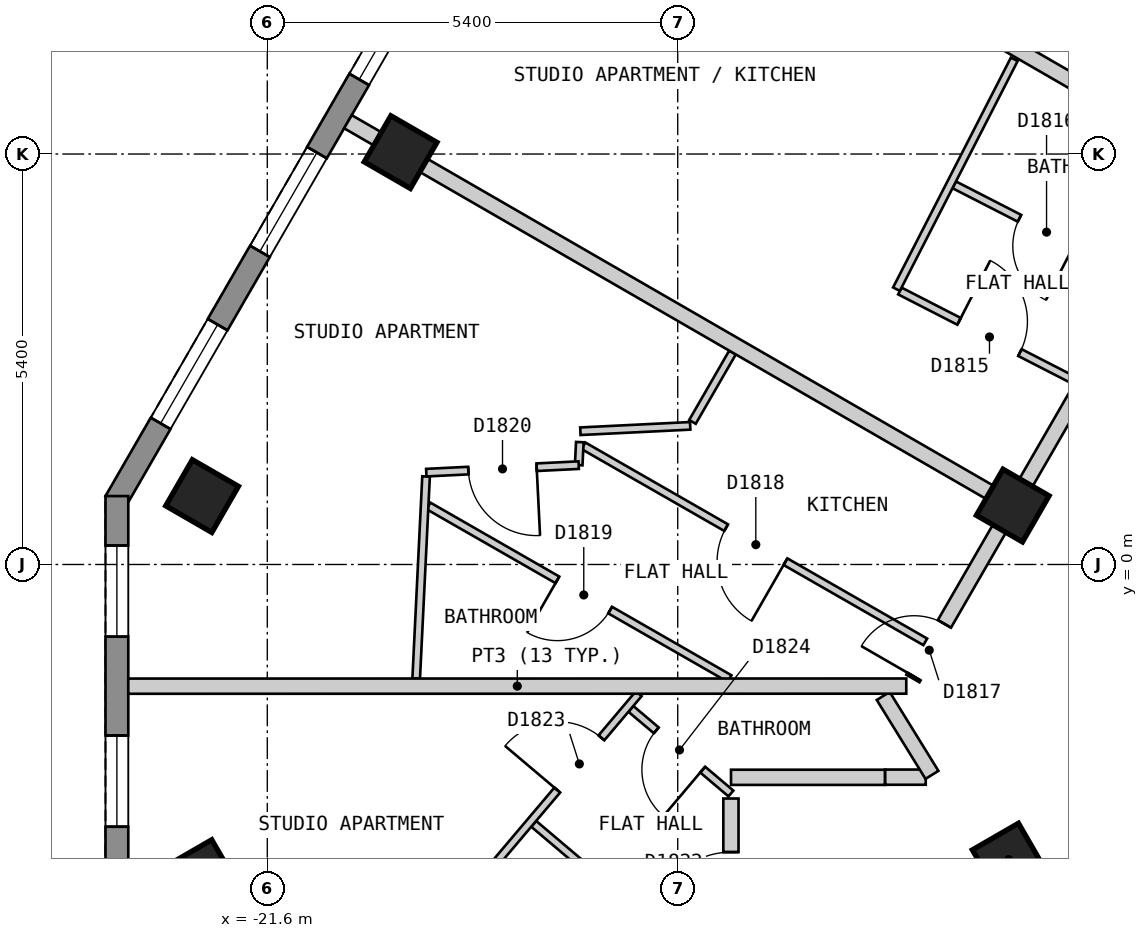
"""IFC4 building model, lengths in metres.
Left out: names, types, materials, properties, quantities, classifications, styles, units other than length and angle.
Written with IfcOpenShell. Run it as: python <this file> out.ifc"""

import sys

from ifc_helpers import new_model, si_unit, direction, frame, frame_2d, origin, origin_2d, place, context, subcontext, project, spatial, polyline, rectangle, outline, extrude, element, fill, save


model = new_model("IFC4")
c1 = context("Model", 3, precision=1e-05, world=origin(), true_north=direction((0.0, 1.0)))
c2 = subcontext(c1, "Body", "Model", "MODEL_VIEW")
j1 = project(units=[si_unit("LENGTHUNIT", "METRE"), si_unit("PLANEANGLEUNIT", "RADIAN")], contexts=[c1])
p1 = place(None, origin())
s1 = spatial("IfcSite", under=j1, at=p1, CompositionType="ELEMENT")
p2 = place(p1, origin())
s2 = spatial("IfcBuilding", under=s1, at=p2, CompositionType="ELEMENT")
p3 = place(p2, frame((0.0, 0.0, 208.8)))
s3 = spatial("IfcBuildingStorey", under=s2, at=p3, CompositionType="ELEMENT", Elevation=208.8)
for number, where, z_axis, x_axis in (
    (1, (-19.846, 5.425, 0.0), (0.0, 0.0, 1.0), (-0.5, -0.866, 0.0)),
    (2, (-22.458, 0.9, 0.0), (0.0, 0.0, 1.0), (-0.5, -0.866, 0.0)),
    (3, (-22.459, -4.1, 0.0), (0.0, 0.0, 1.0), (0.5, -0.866, 0.0)),
    (4, (-11.845, -3.883, 0.0), (0.0, 0.0, 1.0), (0.5, -0.866, 0.0)),
    (5, (-11.792, 0.775, 0.0), (0.0, 0.0, 1.0), (-0.5, -0.866, 0.0)),
):
    element("IfcColumn", number, at=place(p3, frame(where, z_axis=z_axis, x_axis=x_axis)), inside=s3, PredefinedType="COLUMN", context=c2, shape_type="SweptSolid", body=[
        extrude(rectangle(XDim=0.7, YDim=0.7, at=origin_2d()), origin(), (0.0, 0.0, 1.0), 3.0),
    ])
p4 = place(p3, frame((-12.514, 20.025, 0.0), z_axis=(0.0, 0.0, 1.0), x_axis=(-0.500003656944, -0.866023292436, 0.0)))
e6 = element("IfcWall", 6, at=p4, inside=s3, PredefinedType="SOLIDWALL", context=c2, shape_type="SweptSolid", body=[
    extrude(outline(polyline([(0.0, -0.15), (22.17, -0.15), (22.09, 0.15), (0.08, 0.15), (0.0, -0.15)])), origin(), (0.0, 0.0, 1.0), 2.7),
])
p5 = place(p4, frame((1.191, 0.0, 0.15)))
e7 = element("IfcOpeningElement", 7, at=p5, cuts=e6, PredefinedType="OPENING", context=c2, shape_type="SweptSolid", body=[
    extrude(rectangle(XDim=1.5, YDim=2.1, at=frame_2d((0.75, 1.05))), frame((0.0, 0.16, 0.0), z_axis=(0.0, -1.0, 0.0), x_axis=(1.0, 0.0, 0.0)), (0.0, 0.0, 1.0), 0.32),
])
p6 = place(p4, frame((3.804, 0.0, 0.15)))
e8 = element("IfcOpeningElement", 8, at=p6, cuts=e6, PredefinedType="OPENING", context=c2, shape_type="SweptSolid", body=[
    extrude(rectangle(XDim=1.5, YDim=2.1, at=frame_2d((0.75, 1.05))), frame((0.0, 0.16, 0.0), z_axis=(0.0, -1.0, 0.0), x_axis=(1.0, 0.0, 0.0)), (0.0, 0.0, 1.0), 0.32),
])
p7 = place(p4, frame((6.416, 0.0, 0.15)))
e9 = element("IfcOpeningElement", 9, at=p7, cuts=e6, PredefinedType="OPENING", context=c2, shape_type="SweptSolid", body=[
    extrude(rectangle(XDim=1.5, YDim=2.1, at=frame_2d((0.75, 1.05))), frame((0.0, 0.16, 0.0), z_axis=(0.0, -1.0, 0.0), x_axis=(1.0, 0.0, 0.0)), (0.0, 0.0, 1.0), 0.32),
])
p8 = place(p4, frame((9.029, 0.0, 0.15)))
e10 = element("IfcOpeningElement", 10, at=p8, cuts=e6, PredefinedType="OPENING", context=c2, shape_type="SweptSolid", body=[
    extrude(rectangle(XDim=1.5, YDim=2.1, at=frame_2d((0.75, 1.05))), frame((0.0, 0.16, 0.0), z_axis=(0.0, -1.0, 0.0), x_axis=(1.0, 0.0, 0.0)), (0.0, 0.0, 1.0), 0.32),
])
p9 = place(p4, frame((11.641, 0.0, 0.15)))
e11 = element("IfcOpeningElement", 11, at=p9, cuts=e6, PredefinedType="OPENING", context=c2, shape_type="SweptSolid", body=[
    extrude(rectangle(XDim=1.5, YDim=2.1, at=frame_2d((0.75, 1.05))), frame((0.0, 0.16, 0.0), z_axis=(0.0, -1.0, 0.0), x_axis=(1.0, 0.0, 0.0)), (0.0, 0.0, 1.0), 0.32),
])
p10 = place(p4, frame((14.254, 0.0, 0.15)))
e12 = element("IfcOpeningElement", 12, at=p10, cuts=e6, PredefinedType="OPENING", context=c2, shape_type="SweptSolid", body=[
    extrude(rectangle(XDim=1.5, YDim=2.1, at=frame_2d((0.75, 1.05))), frame((0.0, 0.16, 0.0), z_axis=(0.0, -1.0, 0.0), x_axis=(1.0, 0.0, 0.0)), (0.0, 0.0, 1.0), 0.32),
])
p11 = place(p4, frame((16.866, 0.0, 0.15)))
e13 = element("IfcOpeningElement", 13, at=p11, cuts=e6, PredefinedType="OPENING", context=c2, shape_type="SweptSolid", body=[
    extrude(rectangle(XDim=1.5, YDim=2.1, at=frame_2d((0.75, 1.05))), frame((0.0, 0.16, 0.0), z_axis=(0.0, -1.0, 0.0), x_axis=(1.0, 0.0, 0.0)), (0.0, 0.0, 1.0), 0.32),
])
p12 = place(p4, frame((19.479, 0.0, 0.15)))
e14 = element("IfcOpeningElement", 14, at=p12, cuts=e6, PredefinedType="OPENING", context=c2, shape_type="SweptSolid", body=[
    extrude(rectangle(XDim=1.5, YDim=2.1, at=frame_2d((0.75, 1.05))), frame((0.0, 0.16, 0.0), z_axis=(0.0, -1.0, 0.0), x_axis=(1.0, 0.0, 0.0)), (0.0, 0.0, 1.0), 0.32),
])
p13 = place(p3, frame((-23.579, 0.9, 0.0), z_axis=(0.0, 0.0, 1.0), x_axis=(0.0, -1.0, 0.0)))
e15 = element("IfcWall", 15, at=p13, inside=s3, PredefinedType="SOLIDWALL", context=c2, shape_type="SweptSolid", body=[
    extrude(outline(polyline([(0.0, -0.15), (5.0, -0.15), (4.92, 0.15), (0.08, 0.15), (0.0, -0.15)])), origin(), (0.0, 0.0, 1.0), 2.7),
])
p14 = place(p13, frame((0.65, 0.0, 0.15)))
e16 = element("IfcOpeningElement", 16, at=p14, cuts=e15, PredefinedType="OPENING", context=c2, shape_type="SweptSolid", body=[
    extrude(rectangle(XDim=1.2, YDim=2.1, at=frame_2d((0.6, 1.05))), frame((0.0, 0.16, 0.0), z_axis=(0.0, -1.0, 0.0), x_axis=(1.0, 0.0, 0.0)), (0.0, 0.0, 1.0), 0.32),
])
p15 = place(p13, frame((3.15, 0.0, 0.15)))
e17 = element("IfcOpeningElement", 17, at=p15, cuts=e15, PredefinedType="OPENING", context=c2, shape_type="SweptSolid", body=[
    extrude(rectangle(XDim=1.2, YDim=2.1, at=frame_2d((0.6, 1.05))), frame((0.0, 0.16, 0.0), z_axis=(0.0, -1.0, 0.0), x_axis=(1.0, 0.0, 0.0)), (0.0, 0.0, 1.0), 0.32),
])
p16 = place(p3, frame((-13.472, -2.798, 0.0), z_axis=(0.0, 0.0, 1.0), x_axis=(1.0, 0.0, 0.0)))
e18 = element("IfcWall", 18, at=p16, inside=s3, PredefinedType="PARTITIONING", context=c2, shape_type="SweptSolid", body=[
    extrude(rectangle(XDim=0.535, YDim=0.2, at=frame_2d((0.268, 0.0))), origin(), (0.0, 0.0, 1.0), 2.7),
])
p17 = place(p3, frame((-15.499, -2.8, 0.0), z_axis=(0.0, 0.0, 1.0), x_axis=(1.0, 0.0, 0.0)))
e19 = element("IfcWall", 19, at=p17, inside=s3, PredefinedType="PARTITIONING", context=c2, shape_type="SweptSolid", body=[
    extrude(rectangle(XDim=2.025, YDim=0.2, at=frame_2d((1.012, 0.0))), origin(), (0.0, 0.0, 1.0), 2.7),
])
p18 = place(p3, frame((-13.106, -1.5, 0.0), z_axis=(0.0, 0.0, 1.0), x_axis=(0.500025705601, 0.86601056214, 0.0)))
e20 = element("IfcWall", 20, at=p18, inside=s3, PredefinedType="PARTITIONING", context=c2, shape_type="SweptSolid", body=[
    extrude(rectangle(XDim=7.735, YDim=0.2, at=frame_2d((3.868, 0.0))), origin(), (0.0, 0.0, 1.0), 2.7),
])
p19 = place(p18, frame((4.748, 0.0, 0.0)))
e21 = element("IfcOpeningElement", 21, at=p19, cuts=e20, PredefinedType="OPENING", context=c2, shape_type="SweptSolid", body=[
    extrude(rectangle(XDim=1.0, YDim=2.1, at=frame_2d((0.5, 1.05))), frame((0.0, 0.11, 0.0), z_axis=(0.0, -1.0, 0.0), x_axis=(1.0, 0.0, 0.0)), (0.0, 0.0, 1.0), 0.22),
])
p20 = place(p18, frame((0.03, 0.0, 0.0)))
e22 = element("IfcOpeningElement", 22, at=p20, cuts=e20, PredefinedType="OPENING", context=c2, shape_type="SweptSolid", body=[
    extrude(rectangle(XDim=0.8, YDim=2.1, at=frame_2d((0.4, 1.05))), frame((0.0, 0.11, 0.0), z_axis=(0.0, -1.0, 0.0), x_axis=(1.0, 0.0, 0.0)), (0.0, 0.0, 1.0), 0.22),
])
p21 = place(p3, frame((-15.5, -6.599, 0.0), z_axis=(0.0, 0.0, 1.0), x_axis=(0.0, 1.0, 0.0)))
e23 = element("IfcWall", 23, at=p21, inside=s3, PredefinedType="PARTITIONING", context=c2, shape_type="SweptSolid", body=[
    extrude(rectangle(XDim=3.52, YDim=0.2, at=frame_2d((1.76, 0.0))), origin(), (0.0, 0.0, 1.0), 2.7),
])
p22 = place(p21, frame((1.815, 0.0, 0.0)))
e24 = element("IfcOpeningElement", 24, at=p22, cuts=e23, PredefinedType="OPENING", context=c2, shape_type="SweptSolid", body=[
    extrude(rectangle(XDim=1.0, YDim=2.1, at=frame_2d((0.5, 1.05))), frame((0.0, 0.11, 0.0), z_axis=(0.0, -1.0, 0.0), x_axis=(1.0, 0.0, 0.0)), (0.0, 0.0, 1.0), 0.22),
])
p23 = place(p3, frame((-12.562, 4.995, 0.0), z_axis=(0.0, 0.0, 1.0), x_axis=(0.889807979554, -0.456335139478, 0.0)))
e25 = element("IfcWall", 25, at=p23, inside=s3, PredefinedType="PARTITIONING", context=c2, shape_type="SweptSolid", body=[
    extrude(rectangle(XDim=2.68, YDim=0.1, at=frame_2d((1.34, 0.0))), origin(), (0.0, 0.0, 1.0), 2.7),
])
p24 = place(p23, frame((0.965, 0.0, 0.0)))
e26 = element("IfcOpeningElement", 26, at=p24, cuts=e25, PredefinedType="OPENING", context=c2, shape_type="SweptSolid", body=[
    extrude(rectangle(XDim=0.8, YDim=2.1, at=frame_2d((0.4, 1.05))), frame((0.0, 0.06, 0.0), z_axis=(0.0, -1.0, 0.0), x_axis=(1.0, 0.0, 0.0)), (0.0, 0.0, 1.0), 0.12),
])
p25 = place(p3, frame((-13.277, 3.598, 0.0), z_axis=(0.0, 0.0, 1.0), x_axis=(0.889780322893, -0.456389063182, 0.0)))
e27 = element("IfcWall", 27, at=p25, inside=s3, PredefinedType="PARTITIONING", context=c2, shape_type="SweptSolid", body=[
    extrude(rectangle(XDim=2.601, YDim=0.1, at=frame_2d((1.3, 0.0))), origin(), (0.0, 0.0, 1.0), 2.7),
])
p26 = place(p25, frame((0.875, 0.0, 0.0)))
e28 = element("IfcOpeningElement", 28, at=p26, cuts=e27, PredefinedType="OPENING", context=c2, shape_type="SweptSolid", body=[
    extrude(rectangle(XDim=0.9, YDim=2.1, at=frame_2d((0.45, 1.05))), frame((0.0, 0.06, 0.0), z_axis=(0.0, -1.0, 0.0), x_axis=(1.0, 0.0, 0.0)), (0.0, 0.0, 1.0), 0.12),
])
p27 = place(p3, frame((-17.441, 1.562, 0.0), z_axis=(0.0, 0.0, 1.0), x_axis=(0.867419073464, -0.497578286293, 0.0)))
e29 = element("IfcWall", 29, at=p27, inside=s3, PredefinedType="PARTITIONING", context=c2, shape_type="SweptSolid", body=[
    extrude(rectangle(XDim=5.185, YDim=0.1, at=frame_2d((2.593, 0.0))), origin(), (0.0, 0.0, 1.0), 2.7),
])
p28 = place(p27, frame((2.165, 0.0, 0.0)))
e30 = element("IfcOpeningElement", 30, at=p28, cuts=e29, PredefinedType="OPENING", context=c2, shape_type="SweptSolid", body=[
    extrude(rectangle(XDim=0.9, YDim=2.1, at=frame_2d((0.45, 1.05))), frame((0.0, 0.06, 0.0), z_axis=(0.0, -1.0, 0.0), x_axis=(1.0, 0.0, 0.0)), (0.0, 0.0, 1.0), 0.12),
])
p29 = place(p3, frame((-19.48, 0.771, 0.0), z_axis=(0.0, 0.0, 1.0), x_axis=(0.86748552317, -0.497462427817, 0.0)))
e31 = element("IfcWall", 31, at=p29, inside=s3, PredefinedType="PARTITIONING", context=c2, shape_type="SweptSolid", body=[
    extrude(rectangle(XDim=4.567, YDim=0.1, at=frame_2d((2.284, 0.0))), origin(), (0.0, 0.0, 1.0), 2.7),
])
p30 = place(p29, frame((1.956, 0.0, 0.0)))
e32 = element("IfcOpeningElement", 32, at=p30, cuts=e31, PredefinedType="OPENING", context=c2, shape_type="SweptSolid", body=[
    extrude(rectangle(XDim=0.8, YDim=2.1, at=frame_2d((0.4, 1.05))), frame((0.0, 0.06, 0.0), z_axis=(0.0, -1.0, 0.0), x_axis=(1.0, 0.0, 0.0)), (0.0, 0.0, 1.0), 0.12),
])
p31 = place(p3, frame((-16.816, -1.9, 0.0), z_axis=(0.0, 0.0, 1.0), x_axis=(0.763509851459, -0.645796180482, 0.0)))
e33 = element("IfcWall", 33, at=p31, inside=s3, PredefinedType="PARTITIONING", context=c2, shape_type="SweptSolid", body=[
    extrude(rectangle(XDim=1.724, YDim=0.1, at=frame_2d((0.862, 0.0))), origin(), (0.0, 0.0, 1.0), 2.7),
])
p32 = place(p31, frame((0.437, 0.0, 0.0)))
e34 = element("IfcOpeningElement", 34, at=p32, cuts=e33, PredefinedType="OPENING", context=c2, shape_type="SweptSolid", body=[
    extrude(rectangle(XDim=0.8, YDim=2.1, at=frame_2d((0.4, 1.05))), frame((0.0, 0.06, 0.0), z_axis=(0.0, -1.0, 0.0), x_axis=(1.0, 0.0, 0.0)), (0.0, 0.0, 1.0), 0.12),
])
p33 = place(p3, frame((-18.095, -3.412, 0.0), z_axis=(0.0, 0.0, 1.0), x_axis=(0.763564811502, -0.645731196889, 0.0)))
e35 = element("IfcWall", 35, at=p33, inside=s3, PredefinedType="PARTITIONING", context=c2, shape_type="SweptSolid", body=[
    extrude(rectangle(XDim=3.267, YDim=0.1, at=frame_2d((1.634, 0.0))), origin(), (0.0, 0.0, 1.0), 2.7),
])
p34 = place(p33, frame((1.224, 0.0, 0.0)))
e36 = element("IfcOpeningElement", 36, at=p34, cuts=e35, PredefinedType="OPENING", context=c2, shape_type="SweptSolid", body=[
    extrude(rectangle(XDim=0.9, YDim=2.1, at=frame_2d((0.45, 1.05))), frame((0.0, 0.06, 0.0), z_axis=(0.0, -1.0, 0.0), x_axis=(1.0, 0.0, 0.0)), (0.0, 0.0, 1.0), 0.12),
])
p35 = place(p3, frame((-19.625, -5.144, 0.0), z_axis=(0.0, 0.0, 1.0), x_axis=(0.645668001073, 0.763618250431, 0.0)))
e37 = element("IfcWall", 37, at=p35, inside=s3, PredefinedType="PARTITIONING", context=c2, shape_type="SweptSolid", body=[
    extrude(rectangle(XDim=4.51, YDim=0.1, at=frame_2d((2.255, 0.0))), origin(), (0.0, 0.0, 1.0), 2.7),
])
p36 = place(p35, frame((2.85, 0.0, 0.0)))
e38 = element("IfcOpeningElement", 38, at=p36, cuts=e37, PredefinedType="OPENING", context=c2, shape_type="SweptSolid", body=[
    extrude(rectangle(XDim=0.9, YDim=2.1, at=frame_2d((0.45, 1.05))), frame((0.0, 0.06, 0.0), z_axis=(0.0, -1.0, 0.0), x_axis=(1.0, 0.0, 0.0)), (0.0, 0.0, 1.0), 0.12),
])
p37 = place(p3, frame((-16.006, 1.876, 0.0), z_axis=(0.0, 0.0, 1.0), x_axis=(0.499949632511, 0.866054481515, 0.0)))
e39 = element("IfcWall", 39, at=p37, inside=s3, PredefinedType="PARTITIONING", context=c2, shape_type="SweptSolid", body=[
    extrude(rectangle(XDim=1.054, YDim=0.1, at=frame_2d((0.527, 0.0))), origin(), (0.0, 0.0, 1.0), 2.7),
])
p38 = place(p3, frame((-13.322, 3.622, 0.0), z_axis=(0.0, 0.0, 1.0), x_axis=(0.456157649007, 0.889898982611, 0.0)))
e40 = element("IfcWall", 40, at=p38, inside=s3, PredefinedType="PARTITIONING", context=c2, shape_type="SweptSolid", body=[
    extrude(rectangle(XDim=3.398, YDim=0.1, at=frame_2d((1.699, 0.0))), origin(), (0.0, 0.0, 1.0), 2.7),
])
p39 = place(p3, frame((-17.503, 1.307, 0.0), z_axis=(0.0, 0.0, 1.0), x_axis=(0.049055201451, 0.99879606888, 0.0)))
e41 = element("IfcWall", 41, at=p39, inside=s3, PredefinedType="PARTITIONING", context=c2, shape_type="SweptSolid", body=[
    extrude(rectangle(XDim=0.303, YDim=0.1, at=frame_2d((0.152, 0.0))), origin(), (0.0, 0.0, 1.0), 2.7),
])
p40 = place(p3, frame((-19.641, -1.5, 0.0), z_axis=(0.0, 0.0, 1.0), x_axis=(0.048898906005, 0.998803732968, 0.0)))
e42 = element("IfcWall", 42, at=p40, inside=s3, PredefinedType="PARTITIONING", context=c2, shape_type="SweptSolid", body=[
    extrude(rectangle(XDim=2.661, YDim=0.1, at=frame_2d((1.331, 0.0))), origin(), (0.0, 0.0, 1.0), 2.7),
])
p41 = place(p3, frame((-19.508, 1.208, 0.0), z_axis=(0.0, 0.0, 1.0), x_axis=(0.998786372978, 0.04925221978, 0.0)))
e43 = element("IfcWall", 43, at=p41, inside=s3, PredefinedType="PARTITIONING", context=c2, shape_type="SweptSolid", body=[
    extrude(rectangle(XDim=2.008, YDim=0.1, at=frame_2d((1.004, 0.0))), origin(), (0.0, 0.0, 1.0), 2.7),
])
p42 = place(p41, frame((0.554, 0.0, 0.0)))
e44 = element("IfcOpeningElement", 44, at=p42, cuts=e43, PredefinedType="OPENING", context=c2, shape_type="SweptSolid", body=[
    extrude(rectangle(XDim=0.9, YDim=2.1, at=frame_2d((0.45, 1.05))), frame((0.0, 0.06, 0.0), z_axis=(0.0, -1.0, 0.0), x_axis=(1.0, 0.0, 0.0)), (0.0, 0.0, 1.0), 0.12),
])
p43 = place(p3, frame((-17.481, 1.753, 0.0), z_axis=(0.0, 0.0, 1.0), x_axis=(0.998793651238, 0.049104401505, 0.0)))
e45 = element("IfcWall", 45, at=p43, inside=s3, PredefinedType="PARTITIONING", context=c2, shape_type="SweptSolid", body=[
    extrude(rectangle(XDim=1.447, YDim=0.1, at=frame_2d((0.723, 0.0))), origin(), (0.0, 0.0, 1.0), 2.7),
])
p44 = place(p3, frame((-20.539, 5.825, 0.0), z_axis=(0.0, 0.0, 1.0), x_axis=(0.866028187226, -0.499995178908, 0.0)))
e46 = element("IfcWall", 46, at=p44, inside=s3, PredefinedType="PARTITIONING", context=c2, shape_type="SweptSolid", body=[
    extrude(rectangle(XDim=9.996, YDim=0.2, at=frame_2d((4.998, 0.0))), origin(), (0.0, 0.0, 1.0), 2.7),
])
p45 = place(p3, frame((-17.926, 10.35, 0.0), z_axis=(0.0, 0.0, 1.0), x_axis=(0.866018411306, -0.500012111133, 0.0)))
e47 = element("IfcWall", 47, at=p45, inside=s3, PredefinedType="PARTITIONING", context=c2, shape_type="SweptSolid", body=[
    extrude(rectangle(XDim=9.898, YDim=0.2, at=frame_2d((4.949, 0.0))), origin(), (0.0, 0.0, 1.0), 2.7),
])
p46 = place(p3, frame((-13.496, -1.73, 0.0), z_axis=(0.0, 0.0, 1.0), x_axis=(0.525458799645, -0.850819046493, 0.0)))
e48 = element("IfcWall", 48, at=p46, inside=s3, PredefinedType="PARTITIONING", context=c2, shape_type="SweptSolid", body=[
    extrude(rectangle(XDim=1.22, YDim=0.2, at=frame_2d((0.61, 0.0))), origin(), (0.0, 0.0, 1.0), 2.7),
])
p47 = place(p3, frame((-23.429, -1.601, 0.0), z_axis=(0.0, 0.0, 1.0), x_axis=(0.999999995449, 9.5406191e-05, 0.0)))
e49 = element("IfcWall", 49, at=p47, inside=s3, PredefinedType="PARTITIONING", context=c2, shape_type="SweptSolid", body=[
    extrude(rectangle(XDim=10.236, YDim=0.2, at=frame_2d((5.118, 0.0))), origin(), (0.0, 0.0, 1.0), 2.7),
])
p48 = place(p10, origin())
e50 = element("IfcWindow", 50, at=p48, inside=s3, PartitioningType="SINGLE_PANEL", PredefinedType="WINDOW", context=c2, shape_type="SweptSolid", body=[
    extrude(rectangle(XDim=1.5, YDim=2.1, at=frame_2d((0.75, 1.05))), frame((0.0, 0.03, 0.0), z_axis=(0.0, -1.0, 0.0), x_axis=(1.0, 0.0, 0.0)), (0.0, 0.0, 1.0), 0.06),
])
fill(e12, e50)
p49 = place(p11, origin())
e51 = element("IfcWindow", 51, at=p49, inside=s3, PartitioningType="SINGLE_PANEL", PredefinedType="WINDOW", context=c2, shape_type="SweptSolid", body=[
    extrude(rectangle(XDim=1.5, YDim=2.1, at=frame_2d((0.75, 1.05))), frame((0.0, 0.03, 0.0), z_axis=(0.0, -1.0, 0.0), x_axis=(1.0, 0.0, 0.0)), (0.0, 0.0, 1.0), 0.06),
])
fill(e13, e51)
p50 = place(p12, origin())
e52 = element("IfcWindow", 52, at=p50, inside=s3, PartitioningType="SINGLE_PANEL", PredefinedType="WINDOW", context=c2, shape_type="SweptSolid", body=[
    extrude(rectangle(XDim=1.5, YDim=2.1, at=frame_2d((0.75, 1.05))), frame((0.0, 0.03, 0.0), z_axis=(0.0, -1.0, 0.0), x_axis=(1.0, 0.0, 0.0)), (0.0, 0.0, 1.0), 0.06),
])
fill(e14, e52)
p51 = place(p14, origin())
e53 = element("IfcWindow", 53, at=p51, inside=s3, PartitioningType="SINGLE_PANEL", PredefinedType="WINDOW", context=c2, shape_type="SweptSolid", body=[
    extrude(rectangle(XDim=1.2, YDim=2.1, at=frame_2d((0.6, 1.05))), frame((0.0, 0.03, 0.0), z_axis=(0.0, -1.0, 0.0), x_axis=(1.0, 0.0, 0.0)), (0.0, 0.0, 1.0), 0.06),
])
fill(e16, e53)
p52 = place(p15, origin())
e54 = element("IfcWindow", 54, at=p52, inside=s3, PartitioningType="SINGLE_PANEL", PredefinedType="WINDOW", context=c2, shape_type="SweptSolid", body=[
    extrude(rectangle(XDim=1.2, YDim=2.1, at=frame_2d((0.6, 1.05))), frame((0.0, 0.03, 0.0), z_axis=(0.0, -1.0, 0.0), x_axis=(1.0, 0.0, 0.0)), (0.0, 0.0, 1.0), 0.06),
])
fill(e17, e54)
p53 = place(p26, origin())
e55 = element("IfcDoor", 55, at=p53, inside=s3, OperationType="SINGLE_SWING_LEFT", PredefinedType="DOOR", context=c2, shape_type="SweptSolid", body=[
    extrude(rectangle(XDim=0.9, YDim=2.1, at=frame_2d((0.45, 1.05))), frame((0.0, 0.025, 0.0), z_axis=(0.0, -1.0, 0.0), x_axis=(1.0, 0.0, 0.0)), (0.0, 0.0, 1.0), 0.05),
])
fill(e28, e55)
p54 = place(p24, origin())
e56 = element("IfcDoor", 56, at=p54, inside=s3, OperationType="SINGLE_SWING_RIGHT", PredefinedType="DOOR", context=c2, shape_type="SweptSolid", body=[
    extrude(rectangle(XDim=0.8, YDim=2.1, at=frame_2d((0.4, 1.05))), frame((0.0, 0.025, 0.0), z_axis=(0.0, -1.0, 0.0), x_axis=(1.0, 0.0, 0.0)), (0.0, 0.0, 1.0), 0.05),
])
fill(e26, e56)
p55 = place(p20, origin())
e57 = element("IfcDoor", 57, at=p55, inside=s3, OperationType="SINGLE_SWING_LEFT", PredefinedType="DOOR", context=c2, shape_type="SweptSolid", body=[
    extrude(rectangle(XDim=0.8, YDim=2.1, at=frame_2d((0.4, 1.05))), frame((0.0, 0.025, 0.0), z_axis=(0.0, -1.0, 0.0), x_axis=(1.0, 0.0, 0.0)), (0.0, 0.0, 1.0), 0.05),
])
fill(e22, e57)
p56 = place(p28, origin())
e58 = element("IfcDoor", 58, at=p56, inside=s3, OperationType="SINGLE_SWING_RIGHT", PredefinedType="DOOR", context=c2, shape_type="SweptSolid", body=[
    extrude(rectangle(XDim=0.9, YDim=2.1, at=frame_2d((0.45, 1.05))), frame((0.0, 0.025, 0.0), z_axis=(0.0, -1.0, 0.0), x_axis=(1.0, 0.0, 0.0)), (0.0, 0.0, 1.0), 0.05),
])
fill(e30, e58)
p57 = place(p30, origin())
e59 = element("IfcDoor", 59, at=p57, inside=s3, OperationType="SINGLE_SWING_LEFT", PredefinedType="DOOR", context=c2, shape_type="SweptSolid", body=[
    extrude(rectangle(XDim=0.8, YDim=2.1, at=frame_2d((0.4, 1.05))), frame((0.0, 0.025, 0.0), z_axis=(0.0, -1.0, 0.0), x_axis=(1.0, 0.0, 0.0)), (0.0, 0.0, 1.0), 0.05),
])
fill(e32, e59)
p58 = place(p42, origin())
e60 = element("IfcDoor", 60, at=p58, inside=s3, OperationType="SINGLE_SWING_RIGHT", PredefinedType="DOOR", context=c2, shape_type="SweptSolid", body=[
    extrude(rectangle(XDim=0.9, YDim=2.1, at=frame_2d((0.45, 1.05))), frame((0.0, 0.025, 0.0), z_axis=(0.0, -1.0, 0.0), x_axis=(1.0, 0.0, 0.0)), (0.0, 0.0, 1.0), 0.05),
])
fill(e44, e60)
p59 = place(p22, origin())
e61 = element("IfcDoor", 61, at=p59, inside=s3, OperationType="SINGLE_SWING_LEFT", PredefinedType="DOOR", context=c2, shape_type="SweptSolid", body=[
    extrude(rectangle(XDim=1.0, YDim=2.1, at=frame_2d((0.5, 1.05))), frame((0.0, 0.025, 0.0), z_axis=(0.0, -1.0, 0.0), x_axis=(1.0, 0.0, 0.0)), (0.0, 0.0, 1.0), 0.05),
])
fill(e24, e61)
p60 = place(p36, origin())
e62 = element("IfcDoor", 62, at=p60, inside=s3, OperationType="SINGLE_SWING_LEFT", PredefinedType="DOOR", context=c2, shape_type="SweptSolid", body=[
    extrude(rectangle(XDim=0.9, YDim=2.1, at=frame_2d((0.45, 1.05))), frame((0.0, 0.025, 0.0), z_axis=(0.0, -1.0, 0.0), x_axis=(1.0, 0.0, 0.0)), (0.0, 0.0, 1.0), 0.05),
])
fill(e38, e62)
p61 = place(p32, origin())
e63 = element("IfcDoor", 63, at=p61, inside=s3, OperationType="SINGLE_SWING_RIGHT", PredefinedType="DOOR", context=c2, shape_type="SweptSolid", body=[
    extrude(rectangle(XDim=0.8, YDim=2.1, at=frame_2d((0.4, 1.05))), frame((0.0, 0.025, 0.0), z_axis=(0.0, -1.0, 0.0), x_axis=(1.0, 0.0, 0.0)), (0.0, 0.0, 1.0), 0.05),
])
fill(e34, e63)
save(model, sys.argv[1])
